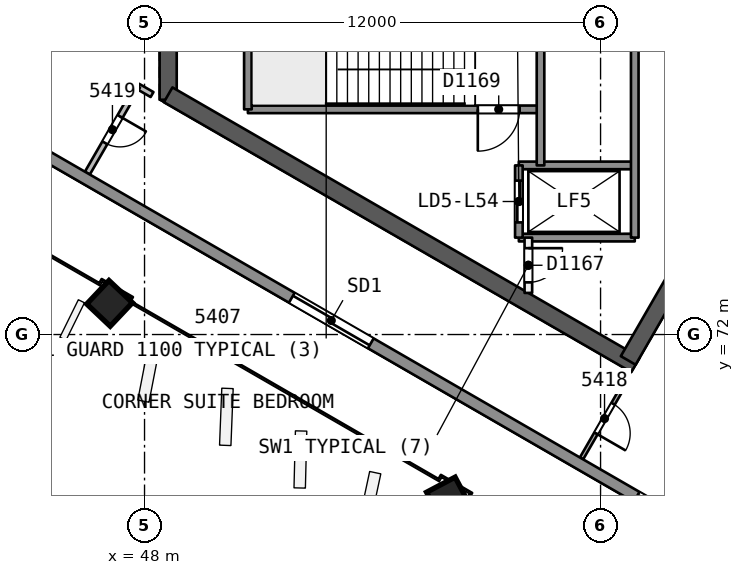
"""IFC4 building model, lengths in metres.
Left out: names, types, materials, properties, quantities, classifications, styles, units other than length and angle.
Written with IfcOpenShell. Run it as: python <this file> out.ifc"""

import sys

from ifc_helpers import new_model, si_unit, direction, frame, frame_2d, origin, origin_2d, place, context, subcontext, project, spatial, rectangle, extrude, element, fill, save


model = new_model("IFC4")
c1 = context("Model", 3, precision=1e-05, world=origin(), true_north=direction((0.0, 1.0)))
c2 = subcontext(c1, "Body", "Model", "MODEL_VIEW")
j1 = project(units=[si_unit("LENGTHUNIT", "METRE"), si_unit("PLANEANGLEUNIT", "RADIAN")], contexts=[c1])
p1 = place(None, origin())
s1 = spatial("IfcSite", under=j1, at=p1, CompositionType="ELEMENT")
p2 = place(p1, origin())
s2 = spatial("IfcBuilding", under=s1, at=p2, CompositionType="ELEMENT")
p3 = place(p2, frame((0.0, 0.0, 220.6)))
s3 = spatial("IfcBuildingStorey", under=s2, at=p3, CompositionType="ELEMENT", Elevation=220.6)
p4 = place(p3, frame((48.622, 81.693, 0.0), z_axis=(0.0, 0.0, 1.0), x_axis=(0.0, -1.0, 0.0)))
e1 = element("IfcWall", 1, at=p4, inside=s3, PredefinedType="SHEAR", context=c2, shape_type="SweptSolid", body=[
    extrude(rectangle(XDim=3.515, YDim=0.45, at=frame_2d((1.758, 0.0))), origin(), (0.0, 0.0, 1.0), 3.7),
])
p5 = place(p3, frame((48.622, 78.307, 0.0), z_axis=(0.0, 0.0, 1.0), x_axis=(0.86602701116, -0.499997215934, 0.0)))
e2 = element("IfcWall", 2, at=p5, inside=s3, PredefinedType="SHEAR", context=c2, shape_type="SweptSolid", body=[
    extrude(rectangle(XDim=14.204, YDim=0.45, at=frame_2d((7.102, 0.0))), origin(), (0.0, 0.0, 1.0), 3.7),
])
p6 = place(p3, frame((60.728, 71.318, 0.0), z_axis=(0.0, 0.0, 1.0), x_axis=(0.500012416173, 0.866018235185, 0.0)))
e3 = element("IfcWall", 3, at=p6, inside=s3, PredefinedType="SHEAR", context=c2, shape_type="SweptSolid", body=[
    extrude(rectangle(XDim=10.155, YDim=0.45, at=frame_2d((5.078, 0.0))), origin(), (0.0, 0.0, 1.0), 3.7),
])
p7 = place(p6, frame((8.005, 0.0, 0.0)))
e4 = element("IfcOpeningElement", 4, at=p7, cuts=e3, PredefinedType="OPENING", context=c2, shape_type="SweptSolid", body=[
    extrude(rectangle(XDim=1.2, YDim=2.1, at=frame_2d((0.6, 1.05))), frame((0.0, 0.235, 0.0), z_axis=(0.0, -1.0, 0.0), x_axis=(1.0, 0.0, 0.0)), (0.0, 0.0, 1.0), 0.471),
])
p8 = place(p3, frame((47.046, 72.812, 0.0), z_axis=(0.02855911485, 0.006793507689, 0.999569019734), x_axis=(-0.865319840559, 0.500766443848, 0.021319996519)))
e5 = element("IfcColumn", 5, at=p8, inside=s3, PredefinedType="COLUMN", context=c2, shape_type="SweptSolid", body=[
    extrude(rectangle(XDim=0.85, YDim=0.85, at=origin_2d()), origin(), (0.0, 0.0, 1.0), 3.702),
])
p9 = place(p3, frame((55.973, 67.658, 0.0), z_axis=(0.019328516974, 0.012138044789, 0.999739504221), x_axis=(-0.865694061334, 0.500459928951, 0.010660754407)))
e6 = element("IfcColumn", 6, at=p9, inside=s3, PredefinedType="COLUMN", context=c2, shape_type="SweptSolid", body=[
    extrude(rectangle(XDim=0.85, YDim=0.85, at=origin_2d()), origin(), (0.0, 0.0, 1.0), 3.701),
])
p10 = place(p3, frame((60.71, 70.838, 0.0), z_axis=(0.0, 0.0, 1.0), x_axis=(-0.49995203611, -0.866053093978, 0.0)))
e7 = element("IfcWall", 7, at=p10, inside=s3, PredefinedType="PARTITIONING", context=c2, shape_type="SweptSolid", body=[
    extrude(rectangle(XDim=2.424, YDim=0.1, at=frame_2d((1.212, 0.0))), origin(), (0.0, 0.0, 1.0), 3.3),
])
p11 = place(p10, frame((0.762, 0.0, 0.0)))
e8 = element("IfcOpeningElement", 8, at=p11, cuts=e7, PredefinedType="OPENING", context=c2, shape_type="SweptSolid", body=[
    extrude(rectangle(XDim=0.9, YDim=2.1, at=frame_2d((0.45, 1.05))), frame((0.0, 0.061, 0.0), z_axis=(0.0, -1.0, 0.0), x_axis=(1.0, 0.0, 0.0)), (0.0, 0.0, 1.0), 0.121),
])
p12 = place(p3, frame((48.198, 78.314, 0.0), z_axis=(0.0, 0.0, 1.0), x_axis=(-0.866019606374, 0.500010041276, 0.0)))
e9 = element("IfcWall", 9, at=p12, inside=s3, PredefinedType="PARTITIONING", context=c2, shape_type="SweptSolid", body=[
    extrude(rectangle(XDim=0.441, YDim=0.15, at=frame_2d((0.22, 0.0))), origin(), (0.0, 0.0, 1.0), 3.3),
])
p13 = place(p3, frame((47.816, 78.535, 0.0), z_axis=(0.0, 0.0, 1.0), x_axis=(-0.50000507839, -0.866022471755, 0.0)))
e10 = element("IfcWall", 10, at=p13, inside=s3, PredefinedType="PARTITIONING", context=c2, shape_type="SweptSolid", body=[
    extrude(rectangle(XDim=2.642, YDim=0.15, at=frame_2d((1.321, 0.0))), origin(), (0.0, 0.0, 1.0), 3.3),
])
p14 = place(p13, frame((0.921, 0.0, 0.0)))
e11 = element("IfcOpeningElement", 11, at=p14, cuts=e10, PredefinedType="OPENING", context=c2, shape_type="SweptSolid", body=[
    extrude(rectangle(XDim=0.8, YDim=2.1, at=frame_2d((0.4, 1.05))), frame((0.0, 0.085, 0.0), z_axis=(0.0, -1.0, 0.0), x_axis=(1.0, 0.0, 0.0)), (0.0, 0.0, 1.0), 0.171),
])
p15 = place(p3, frame((88.155, 52.022, 0.0), z_axis=(0.0, 0.0, 1.0), x_axis=(-0.866024521231, 0.500001528624, 0.0)))
e12 = element("IfcWall", 12, at=p15, inside=s3, PredefinedType="SOLIDWALL", context=c2, shape_type="SweptSolid", body=[
    extrude(rectangle(XDim=50.762, YDim=0.3, at=frame_2d((25.381, 0.0))), origin(), (0.0, 0.0, 1.0), 3.3),
])
p16 = place(p15, frame((23.402, 0.0, 0.0)))
e13 = element("IfcOpeningElement", 13, at=p16, cuts=e12, PredefinedType="OPENING", context=c2, shape_type="SweptSolid", body=[
    extrude(rectangle(XDim=2.4, YDim=2.4, at=frame_2d((1.2, 1.2))), frame((0.0, 0.161, 0.0), z_axis=(0.0, -1.0, 0.0), x_axis=(1.0, 0.0, 0.0)), (0.0, 0.0, 1.0), 0.321),
])
p17 = place(p15, frame((29.013, 0.0, 0.0)))
e14 = element("IfcOpeningElement", 14, at=p17, cuts=e12, PredefinedType="OPENING", context=c2, shape_type="SweptSolid", body=[
    extrude(rectangle(XDim=2.4, YDim=2.4, at=frame_2d((1.2, 1.2))), frame((0.0, 0.161, 0.0), z_axis=(0.0, -1.0, 0.0), x_axis=(1.0, 0.0, 0.0)), (0.0, 0.0, 1.0), 0.321),
])
p18 = place(p15, frame((39.492, 0.0, 0.0)))
e15 = element("IfcOpeningElement", 15, at=p18, cuts=e12, PredefinedType="OPENING", context=c2, shape_type="SweptSolid", body=[
    extrude(rectangle(XDim=2.4, YDim=2.4, at=frame_2d((1.2, 1.2))), frame((0.0, 0.161, 0.0), z_axis=(0.0, -1.0, 0.0), x_axis=(1.0, 0.0, 0.0)), (0.0, 0.0, 1.0), 0.321),
])
p19 = place(p15, frame((18.569, 0.0, 0.0)))
e16 = element("IfcOpeningElement", 16, at=p19, cuts=e12, PredefinedType="OPENING", context=c2, shape_type="SweptSolid", body=[
    extrude(rectangle(XDim=2.4, YDim=2.4, at=frame_2d((1.2, 1.2))), frame((0.0, 0.161, 0.0), z_axis=(0.0, -1.0, 0.0), x_axis=(1.0, 0.0, 0.0)), (0.0, 0.0, 1.0), 0.321),
])
p20 = place(p15, frame((8.878, 0.0, 0.0)))
e17 = element("IfcOpeningElement", 17, at=p20, cuts=e12, PredefinedType="OPENING", context=c2, shape_type="SweptSolid", body=[
    extrude(rectangle(XDim=2.4, YDim=2.4, at=frame_2d((1.2, 1.2))), frame((0.0, 0.161, 0.0), z_axis=(0.0, -1.0, 0.0), x_axis=(1.0, 0.0, 0.0)), (0.0, 0.0, 1.0), 0.321),
])
p21 = place(p3, frame((58.42, 77.925, 0.0), z_axis=(0.0, 0.0, 1.0), x_axis=(-1.0, 0.0, 0.0)))
e18 = element("IfcWall", 18, at=p21, inside=s3, PredefinedType="SOLIDWALL", context=c2, shape_type="SweptSolid", body=[
    extrude(rectangle(XDim=7.7, YDim=0.2, at=frame_2d((3.85, 0.0))), origin(), (0.0, 0.0, 1.0), 3.3),
])
p22 = place(p21, frame((0.55, 0.0, 0.0)))
e19 = element("IfcOpeningElement", 19, at=p22, cuts=e18, PredefinedType="OPENING", context=c2, shape_type="SweptSolid", body=[
    extrude(rectangle(XDim=1.1, YDim=2.1, at=frame_2d((0.55, 1.05))), frame((0.0, 0.11, 0.0), z_axis=(0.0, -1.0, 0.0), x_axis=(1.0, 0.0, 0.0)), (0.0, 0.0, 1.0), 0.221),
])
for number, where, z_axis, x_axis in (
    (20, (60.9, 76.45, 0.0), (0.0, 0.0, 1.0), (-1.0, 0.0, 0.0)),
    (21, (60.9, 74.55, 0.0), (0.0, 0.0, 1.0), (-1.0, 0.0, 0.0)),
):
    element("IfcWall", number, at=place(p3, frame(where, z_axis=z_axis, x_axis=x_axis)), inside=s3, PredefinedType="SOLIDWALL", context=c2, shape_type="SweptSolid", body=[
        extrude(rectangle(XDim=3.05, YDim=0.2, at=frame_2d((1.525, 0.0))), origin(), (0.0, 0.0, 1.0), 3.3),
    ])
p23 = place(p3, frame((60.9, 85.45, 0.0), z_axis=(0.0, 0.0, 1.0), x_axis=(0.0, -1.0, 0.0)))
e22 = element("IfcWall", 22, at=p23, inside=s3, PredefinedType="SOLIDWALL", context=c2, shape_type="SweptSolid", body=[
    extrude(rectangle(XDim=10.9, YDim=0.2, at=frame_2d((5.45, 0.0))), origin(), (0.0, 0.0, 1.0), 3.3),
])
p24 = place(p23, frame((4.0, 0.0, 0.0)))
e23 = element("IfcOpeningElement", 23, at=p24, cuts=e22, PredefinedType="OPENING", context=c2, shape_type="SweptSolid", body=[
    extrude(rectangle(XDim=1.0, YDim=2.1, at=frame_2d((0.5, 1.05))), frame((0.0, 0.11, 0.0), z_axis=(0.0, -1.0, 0.0), x_axis=(1.0, 0.0, 0.0)), (0.0, 0.0, 1.0), 0.221),
])
p25 = place(p3, frame((58.42, 87.09, 0.0), z_axis=(0.0, 0.0, 1.0), x_axis=(0.0, -1.0, 0.0)))
e24 = element("IfcWall", 24, at=p25, inside=s3, PredefinedType="SOLIDWALL", context=c2, shape_type="SweptSolid", body=[
    extrude(rectangle(XDim=10.64, YDim=0.2, at=frame_2d((5.32, 0.0))), origin(), (0.0, 0.0, 1.0), 3.3),
])
p26 = place(p25, frame((0.37, 0.0, 0.0)))
e25 = element("IfcOpeningElement", 25, at=p26, cuts=e24, PredefinedType="OPENING", context=c2, shape_type="SweptSolid", body=[
    extrude(rectangle(XDim=0.9, YDim=2.1, at=frame_2d((0.45, 1.05))), frame((0.0, 0.11, 0.0), z_axis=(0.0, -1.0, 0.0), x_axis=(1.0, 0.0, 0.0)), (0.0, 0.0, 1.0), 0.221),
])
p27 = place(p3, frame((58.1, 74.55, 0.0), z_axis=(0.0, 0.0, 1.0), x_axis=(0.0, -1.0, 0.0)))
e26 = element("IfcWall", 26, at=p27, inside=s3, PredefinedType="PARTITIONING", context=c2, shape_type="SweptSolid", body=[
    extrude(rectangle(XDim=1.455, YDim=0.2, at=frame_2d((0.728, 0.0))), origin(), (0.0, 0.0, 1.0), 3.3),
])
p28 = place(p27, frame((0.278, 0.0, 0.0)))
e27 = element("IfcOpeningElement", 27, at=p28, cuts=e26, PredefinedType="OPENING", context=c2, shape_type="SweptSolid", body=[
    extrude(rectangle(XDim=0.9, YDim=2.1, at=frame_2d((0.45, 1.05))), frame((0.0, 0.11, 0.0), z_axis=(0.0, -1.0, 0.0), x_axis=(1.0, 0.0, 0.0)), (0.0, 0.0, 1.0), 0.221),
])
p29 = place(p3, frame((57.85, 76.45, 0.0), z_axis=(0.0, 0.0, 1.0), x_axis=(0.0, -1.0, 0.0)))
e28 = element("IfcWall", 28, at=p29, inside=s3, PredefinedType="SOLIDWALL", context=c2, shape_type="SweptSolid", body=[
    extrude(rectangle(XDim=1.9, YDim=0.2, at=frame_2d((0.95, 0.0))), origin(), (0.0, 0.0, 1.0), 3.3),
])
p30 = place(p29, frame((0.4, 0.0, 0.0)))
e29 = element("IfcOpeningElement", 29, at=p30, cuts=e28, PredefinedType="OPENING", context=c2, shape_type="SweptSolid", body=[
    extrude(rectangle(XDim=1.1, YDim=2.1, at=frame_2d((0.55, 1.05))), frame((0.0, 0.11, 0.0), z_axis=(0.0, -1.0, 0.0), x_axis=(1.0, 0.0, 0.0)), (0.0, 0.0, 1.0), 0.221),
])
p31 = place(p3, frame((50.72, 82.075, 0.0), z_axis=(0.0, 0.0, 1.0), x_axis=(0.0, -1.0, 0.0)))
e30 = element("IfcWall", 30, at=p31, inside=s3, PredefinedType="SOLIDWALL", context=c2, shape_type="SweptSolid", body=[
    extrude(rectangle(XDim=4.15, YDim=0.2, at=frame_2d((2.075, 0.0))), origin(), (0.0, 0.0, 1.0), 3.3),
])
p32 = place(p11, origin())
e31 = element("IfcDoor", 31, at=p32, inside=s3, OperationType="SINGLE_SWING_RIGHT", PredefinedType="NOTDEFINED", context=c2, shape_type="SweptSolid", body=[
    extrude(rectangle(XDim=0.9, YDim=2.1, at=frame_2d((0.45, 1.05))), frame((0.0, 0.025, 0.0), z_axis=(0.0, -1.0, 0.0), x_axis=(1.0, 0.0, 0.0)), (0.0, 0.0, 1.0), 0.05),
])
fill(e8, e31)
p33 = place(p14, origin())
e32 = element("IfcDoor", 32, at=p33, inside=s3, OperationType="SINGLE_SWING_LEFT", PredefinedType="NOTDEFINED", context=c2, shape_type="SweptSolid", body=[
    extrude(rectangle(XDim=0.8, YDim=2.1, at=frame_2d((0.4, 1.05))), frame((0.0, 0.025, 0.0), z_axis=(0.0, -1.0, 0.0), x_axis=(1.0, 0.0, 0.0)), (0.0, 0.0, 1.0), 0.05),
])
fill(e11, e32)
p34 = place(p18, origin())
e33 = element("IfcDoor", 33, at=p34, inside=s3, OperationType="SLIDING_TO_LEFT", PredefinedType="NOTDEFINED", context=c2, shape_type="SweptSolid", body=[
    extrude(rectangle(XDim=2.4, YDim=2.4, at=frame_2d((1.2, 1.2))), frame((0.0, 0.025, 0.0), z_axis=(0.0, -1.0, 0.0), x_axis=(1.0, 0.0, 0.0)), (0.0, 0.0, 1.0), 0.05),
])
fill(e15, e33)
p35 = place(p30, origin())
e34 = element("IfcDoor", 34, at=p35, inside=s3, OperationType="SLIDING_TO_RIGHT", PredefinedType="NOTDEFINED", context=c2, shape_type="SweptSolid", body=[
    extrude(rectangle(XDim=1.1, YDim=2.1, at=frame_2d((0.55, 1.05))), frame((0.0, 0.025, 0.0), z_axis=(0.0, -1.0, 0.0), x_axis=(1.0, 0.0, 0.0)), (0.0, 0.0, 1.0), 0.05),
])
fill(e29, e34)
p36 = place(p28, origin())
e35 = element("IfcDoor", 35, at=p36, inside=s3, OperationType="SINGLE_SWING_LEFT", PredefinedType="NOTDEFINED", context=c2, shape_type="SweptSolid", body=[
    extrude(rectangle(XDim=0.9, YDim=2.1, at=frame_2d((0.45, 1.05))), frame((0.0, 0.025, 0.0), z_axis=(0.0, -1.0, 0.0), x_axis=(1.0, 0.0, 0.0)), (0.0, 0.0, 1.0), 0.05),
])
fill(e27, e35)
p37 = place(p22, origin())
e36 = element("IfcDoor", 36, at=p37, inside=s3, OperationType="SINGLE_SWING_RIGHT", PredefinedType="NOTDEFINED", context=c2, shape_type="SweptSolid", body=[
    extrude(rectangle(XDim=1.1, YDim=2.1, at=frame_2d((0.55, 1.05))), frame((0.0, 0.025, 0.0), z_axis=(0.0, -1.0, 0.0), x_axis=(1.0, 0.0, 0.0)), (0.0, 0.0, 1.0), 0.05),
])
fill(e19, e36)
save(model, sys.argv[1])
